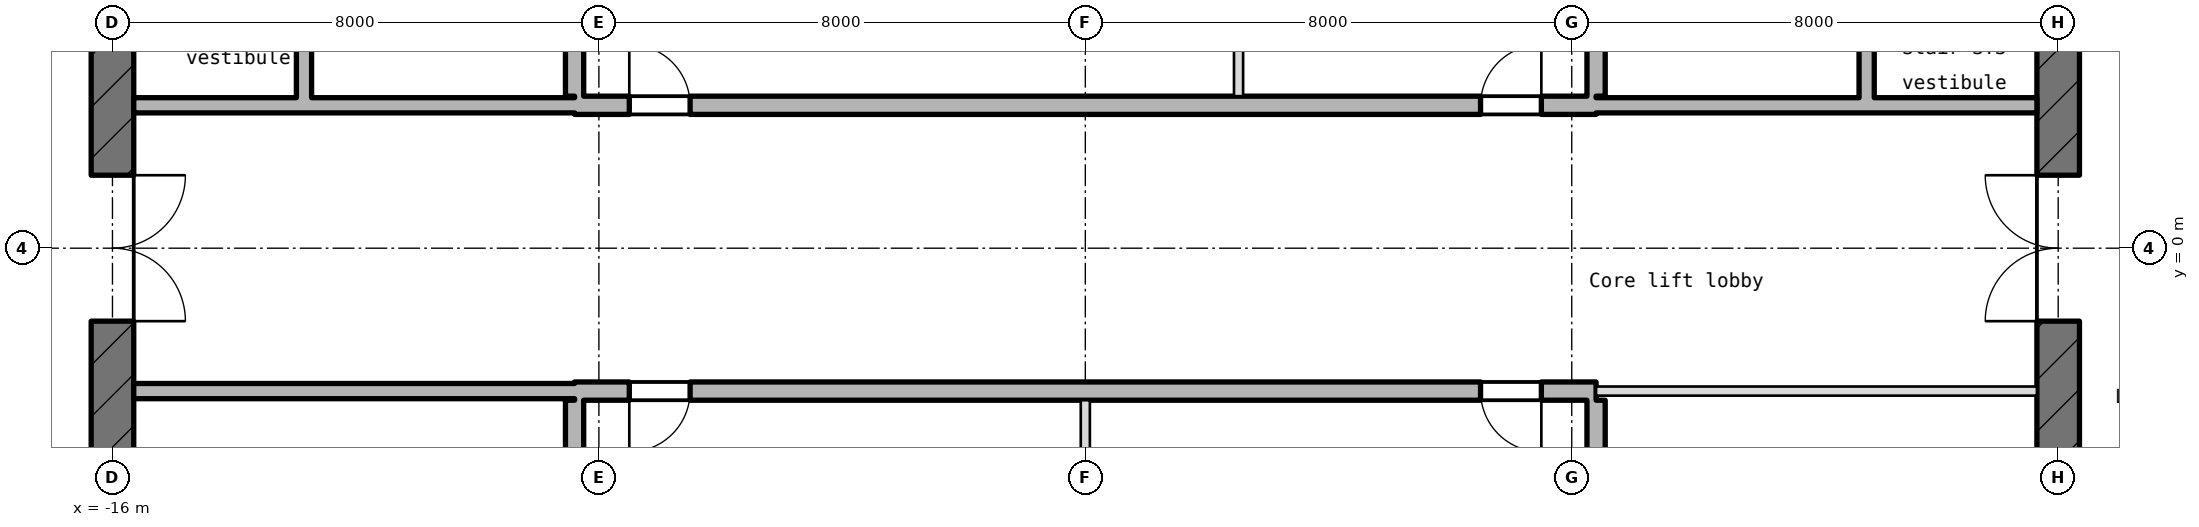
"""IFC4 building model, lengths in metres.
Left out: names, types, materials, properties, quantities, classifications, styles, units other than length and angle.
Written with IfcOpenShell. Run it as: python <this file> out.ifc"""

import sys

from ifc_helpers import new_model, si_unit, direction, frame, frame_2d, origin, place, context, subcontext, project, spatial, rectangle, extrude, element, fill, save


model = new_model("IFC4")
c1 = context("Model", 3, precision=1e-05, world=origin(), true_north=direction((0.0, 1.0)))
c2 = subcontext(c1, "Body", "Model", "MODEL_VIEW")
j1 = project(units=[si_unit("LENGTHUNIT", "METRE"), si_unit("PLANEANGLEUNIT", "RADIAN")], contexts=[c1])
p1 = place(None, origin())
s1 = spatial("IfcSite", under=j1, at=p1, CompositionType="ELEMENT")
p2 = place(p1, origin())
s2 = spatial("IfcBuilding", under=s1, at=p2, CompositionType="ELEMENT")
p3 = place(p2, frame((0.0, 0.0, 401.95)))
s3 = spatial("IfcBuildingStorey", under=s2, at=p3, CompositionType="ELEMENT", Elevation=401.95)
p4 = place(p3, frame((16.0, -10.145, -0.25), z_axis=(0.0, 0.0, 1.0), x_axis=(0.0, 1.0, 0.0)))
e1 = element("IfcWall", 1, at=p4, inside=s3, PredefinedType="SHEAR", context=c2, shape_type="SweptSolid", body=[
    extrude(rectangle(XDim=20.29, YDim=0.7, at=frame_2d((10.145, 0.0))), origin(), (0.0, 0.0, 1.0), 5.55),
])
p5 = place(p4, frame((8.945, 0.0, 0.25)))
e2 = element("IfcOpeningElement", 2, at=p5, cuts=e1, PredefinedType="OPENING", context=c2, shape_type="SweptSolid", body=[
    extrude(rectangle(XDim=2.4, YDim=2.1, at=frame_2d((1.2, 1.05))), frame((0.0, 0.36, 0.0), z_axis=(0.0, -1.0, 0.0), x_axis=(1.0, 0.0, 0.0)), (0.0, 0.0, 1.0), 0.72),
])
p6 = place(p4, frame((13.545, 0.0, 0.25)))
e3 = element("IfcOpeningElement", 3, at=p6, cuts=e1, PredefinedType="OPENING", context=c2, shape_type="SweptSolid", body=[
    extrude(rectangle(XDim=1.2, YDim=2.1, at=frame_2d((0.6, 1.05))), frame((0.0, 0.36, 0.0), z_axis=(0.0, -1.0, 0.0), x_axis=(1.0, 0.0, 0.0)), (0.0, 0.0, 1.0), 0.72),
])
p7 = place(p4, frame((2.4, 0.0, 0.25)))
e4 = element("IfcOpeningElement", 4, at=p7, cuts=e1, PredefinedType="OPENING", context=c2, shape_type="SweptSolid", body=[
    extrude(rectangle(XDim=1.2, YDim=2.1, at=frame_2d((0.6, 1.05))), frame((0.0, 0.36, 0.0), z_axis=(0.0, -1.0, 0.0), x_axis=(1.0, 0.0, 0.0)), (0.0, 0.0, 1.0), 0.72),
])
p8 = place(p3, frame((-16.0, 10.145, -0.25), z_axis=(0.0, 0.0, 1.0), x_axis=(0.0, -1.0, 0.0)))
e5 = element("IfcWall", 5, at=p8, inside=s3, PredefinedType="SHEAR", context=c2, shape_type="SweptSolid", body=[
    extrude(rectangle(XDim=20.29, YDim=0.7, at=frame_2d((10.145, 0.0))), origin(), (0.0, 0.0, 1.0), 5.55),
])
p9 = place(p8, frame((8.945, 0.0, 0.25)))
e6 = element("IfcOpeningElement", 6, at=p9, cuts=e5, PredefinedType="OPENING", context=c2, shape_type="SweptSolid", body=[
    extrude(rectangle(XDim=2.4, YDim=2.1, at=frame_2d((1.2, 1.05))), frame((0.0, 0.36, 0.0), z_axis=(0.0, -1.0, 0.0), x_axis=(1.0, 0.0, 0.0)), (0.0, 0.0, 1.0), 0.72),
])
p10 = place(p8, frame((5.545, 0.0, 0.25)))
e7 = element("IfcOpeningElement", 7, at=p10, cuts=e5, PredefinedType="OPENING", context=c2, shape_type="SweptSolid", body=[
    extrude(rectangle(XDim=1.2, YDim=2.1, at=frame_2d((0.6, 1.05))), frame((0.0, 0.36, 0.0), z_axis=(0.0, -1.0, 0.0), x_axis=(1.0, 0.0, 0.0)), (0.0, 0.0, 1.0), 0.72),
])
p11 = place(p3, frame((-15.65, -2.35, 0.0), z_axis=(0.0, 0.0, 1.0), x_axis=(1.0, 0.0, 0.0)))
e8 = element("IfcWall", 8, at=p11, inside=s3, PredefinedType="STANDARD", context=c2, shape_type="SweptSolid", body=[
    extrude(rectangle(XDim=7.25, YDim=0.25, at=frame_2d((3.625, 0.0))), origin(), (0.0, 0.0, 1.0), 5.3),
])
p12 = place(p3, frame((-8.4, -2.35, -0.25), z_axis=(0.0, 0.0, 1.0), x_axis=(1.0, 0.0, 0.0)))
e9 = element("IfcWall", 9, at=p12, inside=s3, PredefinedType="SHEAR", context=c2, shape_type="SweptSolid", body=[
    extrude(rectangle(XDim=16.8, YDim=0.3, at=frame_2d((8.4, 0.0))), origin(), (0.0, 0.0, 1.0), 5.55),
])
p13 = place(p12, frame((0.9, 0.0, 0.25)))
e10 = element("IfcOpeningElement", 10, at=p13, cuts=e9, PredefinedType="OPENING", context=c2, shape_type="SweptSolid", body=[
    extrude(rectangle(XDim=1.0, YDim=2.1, at=frame_2d((0.5, 1.05))), frame((0.0, 0.16, 0.0), z_axis=(0.0, -1.0, 0.0), x_axis=(1.0, 0.0, 0.0)), (0.0, 0.0, 1.0), 0.32),
])
p14 = place(p12, frame((14.9, 0.0, 0.25)))
e11 = element("IfcOpeningElement", 11, at=p14, cuts=e9, PredefinedType="OPENING", context=c2, shape_type="SweptSolid", body=[
    extrude(rectangle(XDim=1.0, YDim=2.1, at=frame_2d((0.5, 1.05))), frame((0.0, 0.16, 0.0), z_axis=(0.0, -1.0, 0.0), x_axis=(1.0, 0.0, 0.0)), (0.0, 0.0, 1.0), 0.32),
])
p15 = place(p3, frame((8.4, -2.35, 0.0), z_axis=(0.0, 0.0, 1.0), x_axis=(1.0, 0.0, 0.0)))
e12 = element("IfcWall", 12, at=p15, inside=s3, PredefinedType="PARTITIONING", context=c2, shape_type="SweptSolid", body=[
    extrude(rectangle(XDim=7.25, YDim=0.15, at=frame_2d((3.625, 0.0))), origin(), (0.0, 0.0, 1.0), 5.3),
])
p16 = place(p3, frame((-15.65, 2.35, 0.0), z_axis=(0.0, 0.0, 1.0), x_axis=(1.0, 0.0, 0.0)))
e13 = element("IfcWall", 13, at=p16, inside=s3, PredefinedType="STANDARD", context=c2, shape_type="SweptSolid", body=[
    extrude(rectangle(XDim=7.25, YDim=0.25, at=frame_2d((3.625, 0.0))), origin(), (0.0, 0.0, 1.0), 5.3),
])
p17 = place(p3, frame((-8.4, 2.35, -0.25), z_axis=(0.0, 0.0, 1.0), x_axis=(1.0, 0.0, 0.0)))
e14 = element("IfcWall", 14, at=p17, inside=s3, PredefinedType="SHEAR", context=c2, shape_type="SweptSolid", body=[
    extrude(rectangle(XDim=16.8, YDim=0.3, at=frame_2d((8.4, 0.0))), origin(), (0.0, 0.0, 1.0), 5.55),
])
p18 = place(p17, frame((0.9, 0.0, 0.25)))
e15 = element("IfcOpeningElement", 15, at=p18, cuts=e14, PredefinedType="OPENING", context=c2, shape_type="SweptSolid", body=[
    extrude(rectangle(XDim=1.0, YDim=2.1, at=frame_2d((0.5, 1.05))), frame((0.0, 0.16, 0.0), z_axis=(0.0, -1.0, 0.0), x_axis=(1.0, 0.0, 0.0)), (0.0, 0.0, 1.0), 0.32),
])
p19 = place(p17, frame((14.9, 0.0, 0.25)))
e16 = element("IfcOpeningElement", 16, at=p19, cuts=e14, PredefinedType="OPENING", context=c2, shape_type="SweptSolid", body=[
    extrude(rectangle(XDim=1.0, YDim=2.1, at=frame_2d((0.5, 1.05))), frame((0.0, 0.16, 0.0), z_axis=(0.0, -1.0, 0.0), x_axis=(1.0, 0.0, 0.0)), (0.0, 0.0, 1.0), 0.32),
])
p20 = place(p3, frame((8.4, 2.35, 0.0), z_axis=(0.0, 0.0, 1.0), x_axis=(1.0, 0.0, 0.0)))
e17 = element("IfcWall", 17, at=p20, inside=s3, PredefinedType="STANDARD", context=c2, shape_type="SweptSolid", body=[
    extrude(rectangle(XDim=7.25, YDim=0.25, at=frame_2d((3.625, 0.0))), origin(), (0.0, 0.0, 1.0), 5.3),
])
p21 = place(p3, frame((-12.85, 2.475, 0.0), z_axis=(0.0, 0.0, 1.0), x_axis=(0.0, 1.0, 0.0)))
e18 = element("IfcWall", 18, at=p21, inside=s3, PredefinedType="STANDARD", context=c2, shape_type="SweptSolid", body=[
    extrude(rectangle(XDim=3.05, YDim=0.25, at=frame_2d((1.525, 0.0))), origin(), (0.0, 0.0, 1.0), 5.3),
])
p22 = place(p3, frame((-8.4, -8.75, -0.25), z_axis=(0.0, 0.0, 1.0), x_axis=(0.0, 1.0, 0.0)))
e19 = element("IfcWall", 19, at=p22, inside=s3, PredefinedType="SHEAR", context=c2, shape_type="SweptSolid", body=[
    extrude(rectangle(XDim=6.25, YDim=0.3, at=frame_2d((3.125, 0.0))), origin(), (0.0, 0.0, 1.0), 5.55),
])
p23 = place(p3, frame((-8.4, 2.5, -0.25), z_axis=(0.0, 0.0, 1.0), x_axis=(0.0, 1.0, 0.0)))
e20 = element("IfcWall", 20, at=p23, inside=s3, PredefinedType="SHEAR", context=c2, shape_type="SweptSolid", body=[
    extrude(rectangle(XDim=5.85, YDim=0.3, at=frame_2d((2.925, 0.0))), origin(), (0.0, 0.0, 1.0), 5.55),
])
p24 = place(p3, frame((0.0, -5.24, 0.0), z_axis=(0.0, 0.0, 1.0), x_axis=(0.0, 1.0, 0.0)))
e21 = element("IfcWall", 21, at=p24, inside=s3, PredefinedType="PARTITIONING", context=c2, shape_type="SweptSolid", body=[
    extrude(rectangle(XDim=2.74, YDim=0.15, at=frame_2d((1.37, 0.0))), origin(), (0.0, 0.0, 1.0), 5.3),
])
p25 = place(p3, frame((2.52, 2.5, 0.0), z_axis=(0.0, 0.0, 1.0), x_axis=(0.0, 1.0, 0.0)))
e22 = element("IfcWall", 22, at=p25, inside=s3, PredefinedType="PARTITIONING", context=c2, shape_type="SweptSolid", body=[
    extrude(rectangle(XDim=2.775, YDim=0.15, at=frame_2d((1.387, 0.0))), origin(), (0.0, 0.0, 1.0), 5.3),
])
for number, where, z_axis, x_axis in (
    (23, (8.4, -8.35, -0.25), (0.0, 0.0, 1.0), (0.0, 1.0, 0.0)),
    (24, (8.4, 2.5, -0.25), (0.0, 0.0, 1.0), (0.0, 1.0, 0.0)),
):
    element("IfcWall", number, at=place(p3, frame(where, z_axis=z_axis, x_axis=x_axis)), inside=s3, PredefinedType="SHEAR", context=c2, shape_type="SweptSolid", body=[
        extrude(rectangle(XDim=5.85, YDim=0.3, at=frame_2d((2.925, 0.0))), origin(), (0.0, 0.0, 1.0), 5.55),
    ])
p26 = place(p3, frame((12.85, 2.475, 0.0), z_axis=(0.0, 0.0, 1.0), x_axis=(0.0, 1.0, 0.0)))
e25 = element("IfcWall", 25, at=p26, inside=s3, PredefinedType="STANDARD", context=c2, shape_type="SweptSolid", body=[
    extrude(rectangle(XDim=3.05, YDim=0.25, at=frame_2d((1.525, 0.0))), origin(), (0.0, 0.0, 1.0), 5.3),
])
p27 = place(p9, origin())
e26 = element("IfcDoor", 26, at=p27, inside=s3, OperationType="DOUBLE_DOOR_SINGLE_SWING", PredefinedType="DOOR", context=c2, shape_type="SweptSolid", body=[
    extrude(rectangle(XDim=2.4, YDim=2.1, at=frame_2d((1.2, 1.05))), frame((0.0, 0.025, 0.0), z_axis=(0.0, -1.0, 0.0), x_axis=(1.0, 0.0, 0.0)), (0.0, 0.0, 1.0), 0.05),
])
fill(e6, e26)
p28 = place(p5, origin())
e27 = element("IfcDoor", 27, at=p28, inside=s3, OperationType="DOUBLE_DOOR_SINGLE_SWING", PredefinedType="DOOR", context=c2, shape_type="SweptSolid", body=[
    extrude(rectangle(XDim=2.4, YDim=2.1, at=frame_2d((1.2, 1.05))), frame((0.0, 0.025, 0.0), z_axis=(0.0, -1.0, 0.0), x_axis=(1.0, 0.0, 0.0)), (0.0, 0.0, 1.0), 0.05),
])
fill(e2, e27)
p29 = place(p18, origin())
e28 = element("IfcDoor", 28, at=p29, inside=s3, OperationType="SINGLE_SWING_RIGHT", PredefinedType="DOOR", context=c2, shape_type="SweptSolid", body=[
    extrude(rectangle(XDim=1.0, YDim=2.1, at=frame_2d((0.5, 1.05))), frame((0.0, 0.025, 0.0), z_axis=(0.0, -1.0, 0.0), x_axis=(1.0, 0.0, 0.0)), (0.0, 0.0, 1.0), 0.05),
])
fill(e15, e28)
p30 = place(p19, origin())
e29 = element("IfcDoor", 29, at=p30, inside=s3, OperationType="SINGLE_SWING_RIGHT", PredefinedType="DOOR", context=c2, shape_type="SweptSolid", body=[
    extrude(rectangle(XDim=1.0, YDim=2.1, at=frame_2d((0.5, 1.05))), frame((0.0, 0.025, 0.0), z_axis=(0.0, -1.0, 0.0), x_axis=(1.0, 0.0, 0.0)), (0.0, 0.0, 1.0), 0.05),
])
fill(e16, e29)
p31 = place(p13, frame((1.0, 0.0, 0.0), z_axis=(0.0, 0.0, 1.0), x_axis=(-1.0, 0.0, 0.0)))
e30 = element("IfcDoor", 30, at=p31, inside=s3, OperationType="SINGLE_SWING_LEFT", PredefinedType="DOOR", context=c2, shape_type="SweptSolid", body=[
    extrude(rectangle(XDim=1.0, YDim=2.1, at=frame_2d((0.5, 1.05))), frame((0.0, 0.025, 0.0), z_axis=(0.0, -1.0, 0.0), x_axis=(1.0, 0.0, 0.0)), (0.0, 0.0, 1.0), 0.05),
])
fill(e10, e30)
p32 = place(p14, frame((1.0, 0.0, 0.0), z_axis=(0.0, 0.0, 1.0), x_axis=(-1.0, 0.0, 0.0)))
e31 = element("IfcDoor", 31, at=p32, inside=s3, OperationType="SINGLE_SWING_LEFT", PredefinedType="DOOR", context=c2, shape_type="SweptSolid", body=[
    extrude(rectangle(XDim=1.0, YDim=2.1, at=frame_2d((0.5, 1.05))), frame((0.0, 0.025, 0.0), z_axis=(0.0, -1.0, 0.0), x_axis=(1.0, 0.0, 0.0)), (0.0, 0.0, 1.0), 0.05),
])
fill(e11, e31)
save(model, sys.argv[1])
